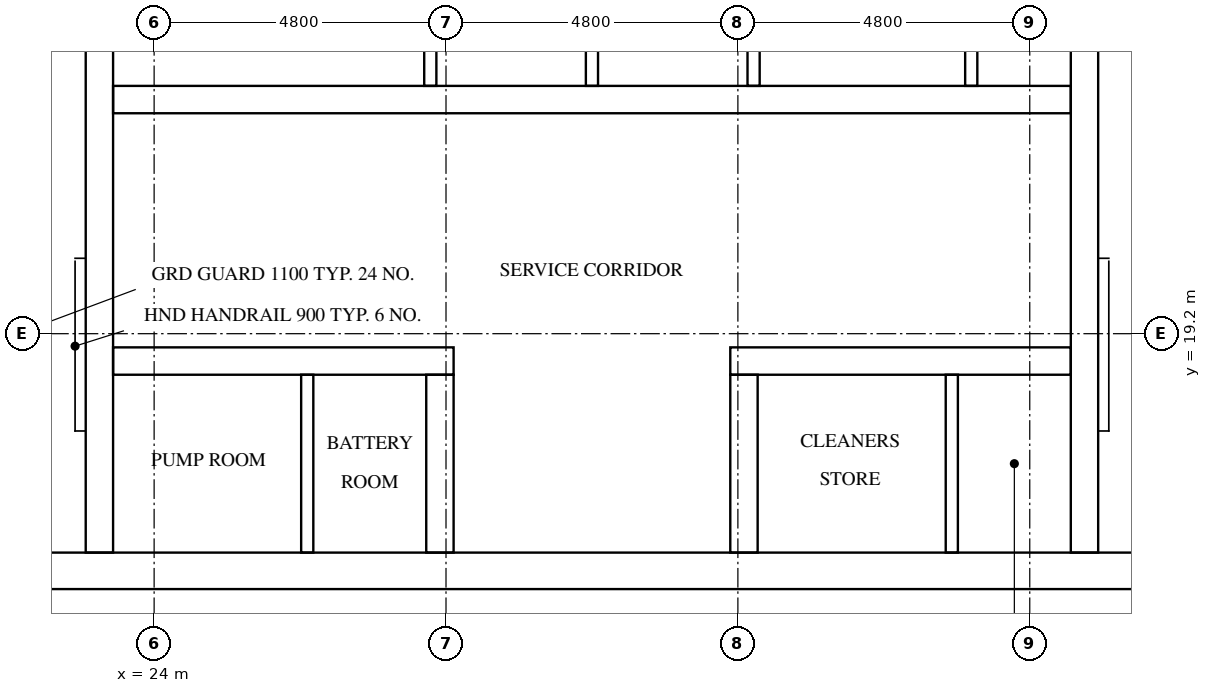
"""IFC4 building model, lengths in metres.
Left out: names, types, materials, properties, quantities, classifications, styles, units other than length and angle.
Written with IfcOpenShell. Run it as: python <this file> out.ifc"""

import sys

from ifc_helpers import new_model, si_unit, direction, frame, frame_2d, origin, place, context, subcontext, project, spatial, rectangle, extrude, element, fill, save


model = new_model("IFC4")
c1 = context("Model", 3, precision=1e-05, world=origin(), true_north=direction((0.0, 1.0)))
c2 = subcontext(c1, "Body", "Model", "MODEL_VIEW")
j1 = project(units=[si_unit("LENGTHUNIT", "METRE"), si_unit("PLANEANGLEUNIT", "RADIAN")], contexts=[c1])
p1 = place(None, origin())
s1 = spatial("IfcSite", under=j1, at=p1, CompositionType="ELEMENT")
p2 = place(p1, origin())
s2 = spatial("IfcBuilding", under=s1, at=p2, CompositionType="ELEMENT")
p3 = place(p2, frame((0.0, 0.0, 238.7)))
s3 = spatial("IfcBuildingStorey", under=s2, at=p3, CompositionType="ELEMENT", Elevation=238.7)
p4 = place(p3, frame((15.0, 15.3, 0.0), z_axis=(0.0, 0.0, 1.0), x_axis=(1.0, 0.0, 0.0)))
e1 = element("IfcWall", 1, at=p4, inside=s3, PredefinedType="SHEAR", context=c2, shape_type="SweptSolid", body=[
    extrude(rectangle(XDim=32.4, YDim=0.6, at=frame_2d((16.2, 0.0))), origin(), (0.0, 0.0, 1.0), 3.2),
])
p5 = place(p4, frame((15.3, 0.0, 0.0)))
e2 = element("IfcOpeningElement", 2, at=p5, cuts=e1, PredefinedType="OPENING", context=c2, shape_type="SweptSolid", body=[
    extrude(rectangle(XDim=1.8, YDim=2.1, at=frame_2d((0.9, 1.05))), frame((0.0, 0.31, 0.0), z_axis=(0.0, -1.0, 0.0), x_axis=(1.0, 0.0, 0.0)), (0.0, 0.0, 1.0), 0.62),
])
p6 = place(p3, frame((23.1, 15.6, 0.0), z_axis=(0.0, 0.0, 1.0), x_axis=(0.0, 1.0, 0.0)))
e3 = element("IfcWall", 3, at=p6, inside=s3, PredefinedType="SHEAR", context=c2, shape_type="SweptSolid", body=[
    extrude(rectangle(XDim=21.6, YDim=0.45, at=frame_2d((10.8, 0.0))), origin(), (0.0, 0.0, 1.0), 3.2),
])
p7 = place(p3, frame((39.3, 15.6, 0.0), z_axis=(0.0, 0.0, 1.0), x_axis=(0.0, 1.0, 0.0)))
e4 = element("IfcWall", 4, at=p7, inside=s3, PredefinedType="SHEAR", context=c2, shape_type="SweptSolid", body=[
    extrude(rectangle(XDim=8.65, YDim=0.45, at=frame_2d((4.325, 0.0))), origin(), (0.0, 0.0, 1.0), 3.2),
])
p8 = place(p3, frame((23.325, 18.75, 0.0), z_axis=(0.0, 0.0, 1.0), x_axis=(1.0, 0.0, 0.0)))
e5 = element("IfcWall", 5, at=p8, inside=s3, PredefinedType="SHEAR", context=c2, shape_type="SweptSolid", body=[
    extrude(rectangle(XDim=5.6, YDim=0.45, at=frame_2d((2.8, 0.0))), origin(), (0.0, 0.0, 1.0), 3.2),
])
p9 = place(p8, frame((1.046, 0.0, 0.0)))
e6 = element("IfcOpeningElement", 6, at=p9, cuts=e5, PredefinedType="OPENING", context=c2, shape_type="SweptSolid", body=[
    extrude(rectangle(XDim=1.0, YDim=2.1, at=frame_2d((0.5, 1.05))), frame((0.0, 0.235, 0.0), z_axis=(0.0, -1.0, 0.0), x_axis=(1.0, 0.0, 0.0)), (0.0, 0.0, 1.0), 0.47),
])
p10 = place(p8, frame((3.721, 0.0, 0.0)))
e7 = element("IfcOpeningElement", 7, at=p10, cuts=e5, PredefinedType="OPENING", context=c2, shape_type="SweptSolid", body=[
    extrude(rectangle(XDim=1.0, YDim=2.1, at=frame_2d((0.5, 1.05))), frame((0.0, 0.235, 0.0), z_axis=(0.0, -1.0, 0.0), x_axis=(1.0, 0.0, 0.0)), (0.0, 0.0, 1.0), 0.47),
])
p11 = place(p3, frame((33.475, 18.75, 0.0), z_axis=(0.0, 0.0, 1.0), x_axis=(1.0, 0.0, 0.0)))
e8 = element("IfcWall", 8, at=p11, inside=s3, PredefinedType="SHEAR", context=c2, shape_type="SweptSolid", body=[
    extrude(rectangle(XDim=5.6, YDim=0.45, at=frame_2d((2.8, 0.0))), origin(), (0.0, 0.0, 1.0), 3.2),
])
p12 = place(p11, frame((1.497, 0.0, 0.0)))
e9 = element("IfcOpeningElement", 9, at=p12, cuts=e8, PredefinedType="OPENING", context=c2, shape_type="SweptSolid", body=[
    extrude(rectangle(XDim=1.0, YDim=2.1, at=frame_2d((0.5, 1.05))), frame((0.0, 0.235, 0.0), z_axis=(0.0, -1.0, 0.0), x_axis=(1.0, 0.0, 0.0)), (0.0, 0.0, 1.0), 0.47),
])
p13 = place(p11, frame((4.171, 0.0, 0.0)))
e10 = element("IfcOpeningElement", 10, at=p13, cuts=e8, PredefinedType="OPENING", context=c2, shape_type="SweptSolid", body=[
    extrude(rectangle(XDim=1.0, YDim=2.1, at=frame_2d((0.5, 1.05))), frame((0.0, 0.235, 0.0), z_axis=(0.0, -1.0, 0.0), x_axis=(1.0, 0.0, 0.0)), (0.0, 0.0, 1.0), 0.47),
])
p14 = place(p3, frame((23.325, 23.05, 0.0), z_axis=(0.0, 0.0, 1.0), x_axis=(1.0, 0.0, 0.0)))
e11 = element("IfcWall", 11, at=p14, inside=s3, PredefinedType="SHEAR", context=c2, shape_type="SweptSolid", body=[
    extrude(rectangle(XDim=15.75, YDim=0.45, at=frame_2d((7.875, 0.0))), origin(), (0.0, 0.0, 1.0), 3.2),
])
p15 = place(p14, frame((2.058, 0.0, 0.0)))
e12 = element("IfcOpeningElement", 12, at=p15, cuts=e11, PredefinedType="OPENING", context=c2, shape_type="SweptSolid", body=[
    extrude(rectangle(XDim=1.0, YDim=2.1, at=frame_2d((0.5, 1.05))), frame((0.0, 0.235, 0.0), z_axis=(0.0, -1.0, 0.0), x_axis=(1.0, 0.0, 0.0)), (0.0, 0.0, 1.0), 0.47),
])
p16 = place(p14, frame((11.823, 0.0, 0.0)))
e13 = element("IfcOpeningElement", 13, at=p16, cuts=e11, PredefinedType="OPENING", context=c2, shape_type="SweptSolid", body=[
    extrude(rectangle(XDim=1.0, YDim=2.1, at=frame_2d((0.5, 1.05))), frame((0.0, 0.235, 0.0), z_axis=(0.0, -1.0, 0.0), x_axis=(1.0, 0.0, 0.0)), (0.0, 0.0, 1.0), 0.47),
])
p17 = place(p14, frame((14.481, 0.0, 0.0)))
e14 = element("IfcOpeningElement", 14, at=p17, cuts=e11, PredefinedType="OPENING", context=c2, shape_type="SweptSolid", body=[
    extrude(rectangle(XDim=1.0, YDim=2.1, at=frame_2d((0.5, 1.05))), frame((0.0, 0.235, 0.0), z_axis=(0.0, -1.0, 0.0), x_axis=(1.0, 0.0, 0.0)), (0.0, 0.0, 1.0), 0.47),
])
for number, where, z_axis, x_axis in (
    (15, (28.7, 15.6, 0.0), (0.0, 0.0, 1.0), (0.0, 1.0, 0.0)),
    (16, (33.7, 15.6, 0.0), (0.0, 0.0, 1.0), (0.0, 1.0, 0.0)),
):
    element("IfcWall", number, at=place(p3, frame(where, z_axis=z_axis, x_axis=x_axis)), inside=s3, PredefinedType="SHEAR", context=c2, shape_type="SweptSolid", body=[
        extrude(rectangle(XDim=2.925, YDim=0.45, at=frame_2d((1.462, 0.0))), origin(), (0.0, 0.0, 1.0), 3.2),
    ])
for number, where, z_axis, x_axis in (
    (17, (28.542, 23.275, 0.0), (0.0, 0.0, 1.0), (0.0, 1.0, 0.0)),
    (18, (31.2, 23.275, 0.0), (0.0, 0.0, 1.0), (0.0, 1.0, 0.0)),
    (19, (33.858, 23.275, 0.0), (0.0, 0.0, 1.0), (0.0, 1.0, 0.0)),
):
    element("IfcWall", number, at=place(p3, frame(where, z_axis=z_axis, x_axis=x_axis)), inside=s3, PredefinedType="SOLIDWALL", context=c2, shape_type="SweptSolid", body=[
        extrude(rectangle(XDim=2.65, YDim=0.2, at=frame_2d((1.325, 0.0))), origin(), (0.0, 0.0, 1.0), 3.2),
    ])
p18 = place(p3, frame((37.438, 23.275, 0.0), z_axis=(0.0, 0.0, 1.0), x_axis=(0.0, 1.0, 0.0)))
e20 = element("IfcWall", 20, at=p18, inside=s3, PredefinedType="PARTITIONING", context=c2, shape_type="SweptSolid", body=[
    extrude(rectangle(XDim=2.65, YDim=0.2, at=frame_2d((1.325, 0.0))), origin(), (0.0, 0.0, 1.0), 3.2),
])
for number, where, z_axis, x_axis in (
    (21, (26.518, 15.6, 0.0), (0.0, 0.0, 1.0), (0.0, 1.0, 0.0)),
    (22, (37.118, 15.6, 0.0), (0.0, 0.0, 1.0), (0.0, 1.0, 0.0)),
):
    element("IfcWall", number, at=place(p3, frame(where, z_axis=z_axis, x_axis=x_axis)), inside=s3, PredefinedType="PARTITIONING", context=c2, shape_type="SweptSolid", body=[
        extrude(rectangle(XDim=2.925, YDim=0.2, at=frame_2d((1.462, 0.0))), origin(), (0.0, 0.0, 1.0), 3.2),
    ])
p19 = place(p5, frame((1.8, 0.0, 0.0), z_axis=(0.0, 0.0, 1.0), x_axis=(-1.0, 0.0, 0.0)))
e23 = element("IfcDoor", 23, at=p19, inside=s3, OperationType="DOUBLE_DOOR_SINGLE_SWING", PredefinedType="DOOR", context=c2, shape_type="SweptSolid", body=[
    extrude(rectangle(XDim=1.8, YDim=2.1, at=frame_2d((0.9, 1.05))), frame((0.0, 0.025, 0.0), z_axis=(0.0, -1.0, 0.0), x_axis=(1.0, 0.0, 0.0)), (0.0, 0.0, 1.0), 0.05),
])
fill(e2, e23)
p20 = place(p15, frame((1.0, 0.0, 0.0), z_axis=(0.0, 0.0, 1.0), x_axis=(-1.0, 0.0, 0.0)))
e24 = element("IfcDoor", 24, at=p20, inside=s3, OperationType="SINGLE_SWING_LEFT", PredefinedType="DOOR", context=c2, shape_type="SweptSolid", body=[
    extrude(rectangle(XDim=1.0, YDim=2.1, at=frame_2d((0.5, 1.05))), frame((0.0, 0.025, 0.0), z_axis=(0.0, -1.0, 0.0), x_axis=(1.0, 0.0, 0.0)), (0.0, 0.0, 1.0), 0.05),
])
fill(e12, e24)
p21 = place(p16, frame((1.0, 0.0, 0.0), z_axis=(0.0, 0.0, 1.0), x_axis=(-1.0, 0.0, 0.0)))
e25 = element("IfcDoor", 25, at=p21, inside=s3, OperationType="SINGLE_SWING_RIGHT", PredefinedType="DOOR", context=c2, shape_type="SweptSolid", body=[
    extrude(rectangle(XDim=1.0, YDim=2.1, at=frame_2d((0.5, 1.05))), frame((0.0, 0.025, 0.0), z_axis=(0.0, -1.0, 0.0), x_axis=(1.0, 0.0, 0.0)), (0.0, 0.0, 1.0), 0.05),
])
fill(e13, e25)
p22 = place(p17, frame((1.0, 0.0, 0.0), z_axis=(0.0, 0.0, 1.0), x_axis=(-1.0, 0.0, 0.0)))
e26 = element("IfcDoor", 26, at=p22, inside=s3, OperationType="SINGLE_SWING_LEFT", PredefinedType="DOOR", context=c2, shape_type="SweptSolid", body=[
    extrude(rectangle(XDim=1.0, YDim=2.1, at=frame_2d((0.5, 1.05))), frame((0.0, 0.025, 0.0), z_axis=(0.0, -1.0, 0.0), x_axis=(1.0, 0.0, 0.0)), (0.0, 0.0, 1.0), 0.05),
])
fill(e14, e26)
p23 = place(p9, origin())
e27 = element("IfcDoor", 27, at=p23, inside=s3, OperationType="SINGLE_SWING_RIGHT", PredefinedType="DOOR", context=c2, shape_type="SweptSolid", body=[
    extrude(rectangle(XDim=1.0, YDim=2.1, at=frame_2d((0.5, 1.05))), frame((0.0, 0.025, 0.0), z_axis=(0.0, -1.0, 0.0), x_axis=(1.0, 0.0, 0.0)), (0.0, 0.0, 1.0), 0.05),
])
fill(e6, e27)
p24 = place(p10, origin())
e28 = element("IfcDoor", 28, at=p24, inside=s3, OperationType="SINGLE_SWING_LEFT", PredefinedType="DOOR", context=c2, shape_type="SweptSolid", body=[
    extrude(rectangle(XDim=1.0, YDim=2.1, at=frame_2d((0.5, 1.05))), frame((0.0, 0.025, 0.0), z_axis=(0.0, -1.0, 0.0), x_axis=(1.0, 0.0, 0.0)), (0.0, 0.0, 1.0), 0.05),
])
fill(e7, e28)
p25 = place(p12, origin())
e29 = element("IfcDoor", 29, at=p25, inside=s3, OperationType="SINGLE_SWING_RIGHT", PredefinedType="DOOR", context=c2, shape_type="SweptSolid", body=[
    extrude(rectangle(XDim=1.0, YDim=2.1, at=frame_2d((0.5, 1.05))), frame((0.0, 0.025, 0.0), z_axis=(0.0, -1.0, 0.0), x_axis=(1.0, 0.0, 0.0)), (0.0, 0.0, 1.0), 0.05),
])
fill(e9, e29)
p26 = place(p13, origin())
e30 = element("IfcDoor", 30, at=p26, inside=s3, OperationType="SINGLE_SWING_LEFT", PredefinedType="DOOR", context=c2, shape_type="SweptSolid", body=[
    extrude(rectangle(XDim=1.0, YDim=2.1, at=frame_2d((0.5, 1.05))), frame((0.0, 0.025, 0.0), z_axis=(0.0, -1.0, 0.0), x_axis=(1.0, 0.0, 0.0)), (0.0, 0.0, 1.0), 0.05),
])
fill(e10, e30)
save(model, sys.argv[1])
